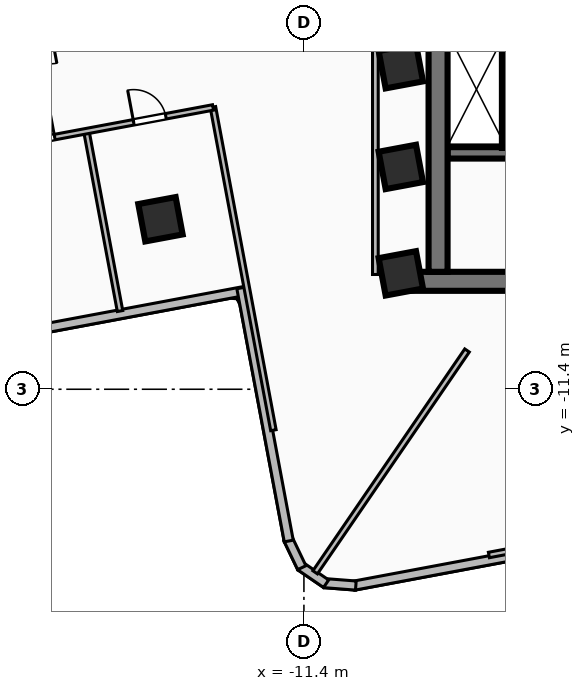
"""IFC4 building model, lengths in metres.
Left out: names, types, materials, properties, quantities, classifications, styles, units other than length and angle.
Written with IfcOpenShell. Run it as: python <this file> out.ifc"""

import sys

from ifc_helpers import new_model, si_unit, direction, frame, frame_2d, origin, origin_2d, place, context, subcontext, project, spatial, rectangle, extrude, element, fill, save


model = new_model("IFC4")
c1 = context("Model", 3, precision=1e-05, world=origin(), true_north=direction((0.0, 1.0)))
c2 = subcontext(c1, "Body", "Model", "MODEL_VIEW")
j1 = project(units=[si_unit("LENGTHUNIT", "METRE"), si_unit("PLANEANGLEUNIT", "RADIAN")], contexts=[c1])
p1 = place(None, origin())
s1 = spatial("IfcSite", under=j1, at=p1, CompositionType="ELEMENT")
p2 = place(p1, origin())
s2 = spatial("IfcBuilding", under=s1, at=p2, CompositionType="ELEMENT")
p3 = place(p2, frame((0.0, 0.0, 103.68)))
s3 = spatial("IfcBuildingStorey", under=s2, at=p3, CompositionType="ELEMENT", Elevation=103.68)
p4 = place(p3, frame((8.78, -8.56, 0.0), z_axis=(0.0, 0.0, 1.0), x_axis=(-1.0, 0.0, 0.0)))
e1 = element("IfcWall", 1, at=p4, inside=s3, PredefinedType="SHEAR", context=c2, shape_type="SweptSolid", body=[
    extrude(rectangle(XDim=17.56, YDim=0.5, at=frame_2d((8.78, 0.0))), origin(), (0.0, 0.0, 1.0), 3.2),
])
p5 = place(p3, frame((-7.87, -8.31, 0.0), z_axis=(0.0, 0.0, 1.0), x_axis=(0.0, 1.0, 0.0)))
e2 = element("IfcWall", 2, at=p5, inside=s3, PredefinedType="SHEAR", context=c2, shape_type="SweptSolid", body=[
    extrude(rectangle(XDim=6.31, YDim=0.5, at=frame_2d((3.155, 0.0))), origin(), (0.0, 0.0, 1.0), 3.2),
])
p6 = place(p3, frame((-7.62, -5.18, 0.0), z_axis=(0.0, 0.0, 1.0), x_axis=(1.0, 0.0, 0.0)))
e3 = element("IfcWall", 3, at=p6, inside=s3, PredefinedType="SOLIDWALL", context=c2, shape_type="SweptSolid", body=[
    extrude(rectangle(XDim=15.24, YDim=0.3, at=frame_2d((7.62, 0.0))), origin(), (0.0, 0.0, 1.0), 3.2),
])
p7 = place(p6, frame((5.77, 0.0, 0.0)))
e4 = element("IfcOpeningElement", 4, at=p7, cuts=e3, PredefinedType="OPENING", context=c2, shape_type="SweptSolid", body=[
    extrude(rectangle(XDim=1.1, YDim=2.15, at=frame_2d((0.55, 1.075))), frame((0.0, 0.16, 0.0), z_axis=(0.0, -1.0, 0.0), x_axis=(1.0, 0.0, 0.0)), (0.0, 0.0, 1.0), 0.32),
])
p8 = place(p6, frame((7.97, 0.0, 0.0)))
e5 = element("IfcOpeningElement", 5, at=p8, cuts=e3, PredefinedType="OPENING", context=c2, shape_type="SweptSolid", body=[
    extrude(rectangle(XDim=1.0, YDim=2.1, at=frame_2d((0.5, 1.05))), frame((0.0, 0.16, 0.0), z_axis=(0.0, -1.0, 0.0), x_axis=(1.0, 0.0, 0.0)), (0.0, 0.0, 1.0), 0.32),
])
p9 = place(p3, frame((-6.08, -5.05, 0.0), z_axis=(0.0, 0.0, 1.0), x_axis=(0.0, 1.0, 0.0)))
e6 = element("IfcWall", 6, at=p9, inside=s3, PredefinedType="SOLIDWALL", context=c2, shape_type="SweptSolid", body=[
    extrude(rectangle(XDim=3.07, YDim=0.22, at=frame_2d((1.535, 0.0))), origin(), (0.0, 0.0, 1.0), 3.2),
])
for number, where, z_axis, x_axis in (
    (7, (-8.85, -5.55, 0.0), (0.0, 0.0, 1.0), (0.983, 0.184, 0.0)),
    (8, (-8.85, -2.9, 0.0), (0.0, 0.0, 1.0), (0.983, 0.184, 0.0)),
    (9, (-8.85, -8.35, 0.0), (0.0, 0.0, 1.0), (0.983, 0.184, 0.0)),
    (10, (-15.175, -6.927, 0.0), (0.0, 0.0, 1.0), (0.983, 0.184, 0.0)),
):
    element("IfcColumn", number, at=place(p3, frame(where, z_axis=z_axis, x_axis=x_axis)), inside=s3, PredefinedType="COLUMN", context=c2, shape_type="SweptSolid", body=[
        extrude(rectangle(XDim=1.0, YDim=1.0, at=origin_2d()), origin(), (0.0, 0.0, 1.0), 3.6),
    ])
p10 = place(p3, frame((-12.935, -8.809, 0.0), z_axis=(0.0, 0.0, 1.0), x_axis=(-0.982922588066, -0.184019525782, 0.0)))
e11 = element("IfcWall", 11, at=p10, inside=s3, PredefinedType="SOLIDWALL", context=c2, shape_type="SweptSolid", body=[
    extrude(rectangle(XDim=16.275, YDim=0.24, at=frame_2d((8.137, 0.0))), origin(), (0.0, 0.0, 1.0), 3.2),
])
p11 = place(p10, frame((12.475, 0.0, 0.85)))
e12 = element("IfcOpeningElement", 12, at=p11, cuts=e11, PredefinedType="OPENING", context=c2, shape_type="SweptSolid", body=[
    extrude(rectangle(XDim=2.7, YDim=2.1, at=frame_2d((1.35, 1.05))), frame((0.0, 0.13, 0.0), z_axis=(0.0, -1.0, 0.0), x_axis=(1.0, 0.0, 0.0)), (0.0, 0.0, 1.0), 0.26),
])
p12 = place(p3, frame((-4.113, -15.45, 0.0), z_axis=(0.0, 0.0, 1.0), x_axis=(-0.982913564854, -0.18406771587, 0.0)))
e13 = element("IfcWall", 13, at=p12, inside=s3, PredefinedType="SOLIDWALL", context=c2, shape_type="SweptSolid", body=[
    extrude(rectangle(XDim=6.075, YDim=0.24, at=frame_2d((3.037, 0.0))), origin(), (0.0, 0.0, 1.0), 2.346),
])
p13 = place(p3, frame((-10.034, -16.565, 0.0), z_axis=(0.0, 0.0, 1.0), x_axis=(-0.997030229365, 0.077011179273, 0.0)))
e14 = element("IfcWall", 14, at=p13, inside=s3, PredefinedType="SOLIDWALL", context=c2, shape_type="SweptSolid", body=[
    extrude(rectangle(XDim=0.831, YDim=0.24, at=frame_2d((0.415, 0.0))), origin(), (0.0, 0.0, 1.0), 3.2),
])
p14 = place(p3, frame((-10.816, -16.517, 0.0), z_axis=(0.0, 0.0, 1.0), x_axis=(-0.825814611055, 0.563941688624, 0.0)))
e15 = element("IfcWall", 15, at=p14, inside=s3, PredefinedType="SOLIDWALL", context=c2, shape_type="SweptSolid", body=[
    extrude(rectangle(XDim=0.814, YDim=0.24, at=frame_2d((0.407, 0.0))), origin(), (0.0, 0.0, 1.0), 3.2),
])
p15 = place(p3, frame((-11.456, -16.095, 0.0), z_axis=(0.0, 0.0, 1.0), x_axis=(-0.431642510533, 0.902044756706, 0.0)))
e16 = element("IfcWall", 16, at=p15, inside=s3, PredefinedType="SOLIDWALL", context=c2, shape_type="SweptSolid", body=[
    extrude(rectangle(XDim=0.832, YDim=0.24, at=frame_2d((0.416, 0.0))), origin(), (0.0, 0.0, 1.0), 3.2),
])
p16 = place(p3, frame((-11.799, -15.393, 0.0), z_axis=(0.0, 0.0, 1.0), x_axis=(-0.184184115697, 0.982891759821, 0.0)))
e17 = element("IfcWall", 17, at=p16, inside=s3, PredefinedType="SOLIDWALL", context=c2, shape_type="SweptSolid", body=[
    extrude(rectangle(XDim=6.776, YDim=0.24, at=frame_2d((3.388, 0.0))), origin(), (0.0, 0.0, 1.0), 3.2),
])
p17 = place(p3, frame((-9.52, -8.38, 0.0), z_axis=(0.0, 0.0, 1.0), x_axis=(0.0, 1.0, 0.0)))
e18 = element("IfcWall", 18, at=p17, inside=s3, PredefinedType="PARTITIONING", context=c2, shape_type="SweptSolid", body=[
    extrude(rectangle(XDim=6.63, YDim=0.15, at=frame_2d((3.315, 0.0))), origin(), (0.0, 0.0, 1.0), 2.346),
])
p18 = place(p3, frame((-7.108, -10.38, 0.0), z_axis=(0.0, 0.0, 1.0), x_axis=(-0.564900413187, -0.825159089619, 0.0)))
e19 = element("IfcWall", 19, at=p18, inside=s3, PredefinedType="PARTITIONING", context=c2, shape_type="SweptSolid", body=[
    extrude(rectangle(XDim=7.074, YDim=0.145, at=frame_2d((3.537, 0.0))), origin(), (0.0, 0.0, 1.0), 2.346),
])
p19 = place(p3, frame((-13.794, -3.975, 0.0), z_axis=(0.0, 0.0, 1.0), x_axis=(0.183947683851, -0.982936035358, 0.0)))
e20 = element("IfcWall", 20, at=p19, inside=s3, PredefinedType="PARTITIONING", context=c2, shape_type="SweptSolid", body=[
    extrude(rectangle(XDim=8.65, YDim=0.145, at=frame_2d((4.325, 0.0))), origin(), (0.0, 0.0, 1.0), 2.346),
])
p20 = place(p3, frame((-17.121, -4.628, 0.0), z_axis=(0.0, 0.0, 1.0), x_axis=(0.183922768694, -0.98294069768, 0.0)))
e21 = element("IfcWall", 21, at=p20, inside=s3, PredefinedType="PARTITIONING", context=c2, shape_type="SweptSolid", body=[
    extrude(rectangle(XDim=4.796, YDim=0.145, at=frame_2d((2.398, 0.0))), origin(), (0.0, 0.0, 1.0), 2.346),
])
p21 = place(p3, frame((-19.641, -5.08, 0.0), z_axis=(0.0, 0.0, 1.0), x_axis=(0.982925094433, 0.184006137763, 0.0)))
e22 = element("IfcWall", 22, at=p21, inside=s3, PredefinedType="PARTITIONING", context=c2, shape_type="SweptSolid", body=[
    extrude(rectangle(XDim=5.951, YDim=0.145, at=frame_2d((2.975, 0.0))), origin(), (0.0, 0.0, 1.0), 3.2),
])
p22 = place(p21, frame((3.826, 0.0, 0.0)))
e23 = element("IfcOpeningElement", 23, at=p22, cuts=e22, PredefinedType="OPENING", context=c2, shape_type="SweptSolid", body=[
    extrude(rectangle(XDim=0.86, YDim=2.04, at=frame_2d((0.43, 1.02))), frame((0.0, 0.083, 0.0), z_axis=(0.0, -1.0, 0.0), x_axis=(1.0, 0.0, 0.0)), (0.0, 0.0, 1.0), 0.165),
])
p23 = place(p21, frame((0.851, 0.0, 0.0)))
e24 = element("IfcOpeningElement", 24, at=p23, cuts=e22, PredefinedType="OPENING", context=c2, shape_type="SweptSolid", body=[
    extrude(rectangle(XDim=0.86, YDim=2.04, at=frame_2d((0.43, 1.02))), frame((0.0, 0.083, 0.0), z_axis=(0.0, -1.0, 0.0), x_axis=(1.0, 0.0, 0.0)), (0.0, 0.0, 1.0), 0.165),
])
p24 = place(p3, frame((-6.532, -15.761, 0.0), z_axis=(0.0, 0.0, 1.0), x_axis=(0.98292290903, 0.184017811376, 0.0)))
e25 = element("IfcWall", 25, at=p24, inside=s3, PredefinedType="PARTITIONING", context=c2, shape_type="SweptSolid", body=[
    extrude(rectangle(XDim=7.95, YDim=0.145, at=frame_2d((3.975, 0.0))), origin(), (0.0, 0.0, 1.0), 2.346),
])
p25 = place(p22, origin())
e26 = element("IfcDoor", 26, at=p25, inside=s3, OperationType="SINGLE_SWING_LEFT", PredefinedType="DOOR", context=c2, shape_type="SweptSolid", body=[
    extrude(rectangle(XDim=0.86, YDim=2.04, at=frame_2d((0.43, 1.02))), frame((0.0, 0.025, 0.0), z_axis=(0.0, -1.0, 0.0), x_axis=(1.0, 0.0, 0.0)), (0.0, 0.0, 1.0), 0.05),
])
fill(e23, e26)
p26 = place(p23, origin())
e27 = element("IfcDoor", 27, at=p26, inside=s3, OperationType="SINGLE_SWING_RIGHT", PredefinedType="DOOR", context=c2, shape_type="SweptSolid", body=[
    extrude(rectangle(XDim=0.86, YDim=2.04, at=frame_2d((0.43, 1.02))), frame((0.0, 0.025, 0.0), z_axis=(0.0, -1.0, 0.0), x_axis=(1.0, 0.0, 0.0)), (0.0, 0.0, 1.0), 0.05),
])
fill(e24, e27)
save(model, sys.argv[1])
